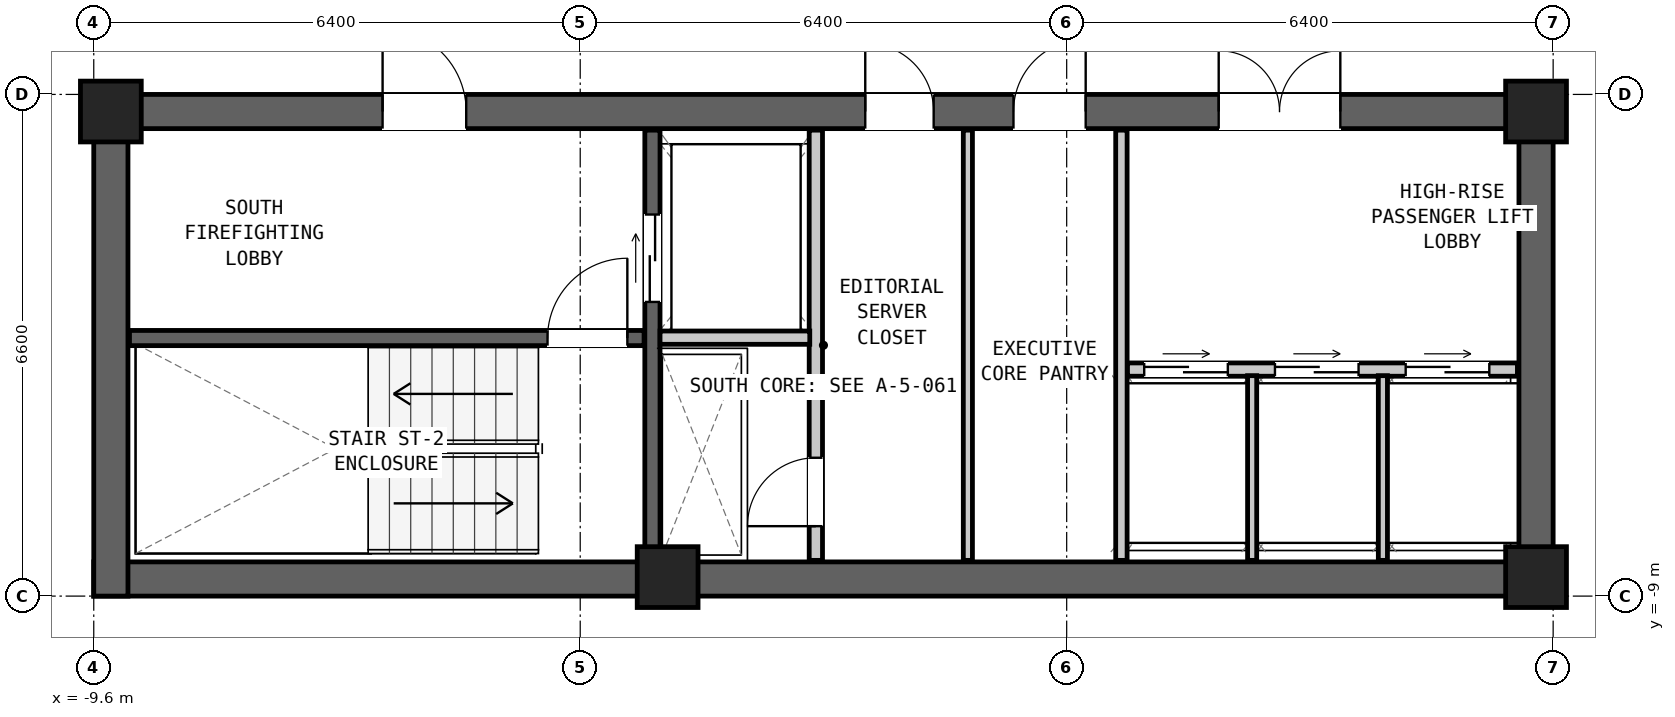
"""IFC4 building model, lengths in metres.
Left out: names, types, materials, properties, quantities, classifications, styles, units other than length and angle.
Written with IfcOpenShell. Run it as: python <this file> out.ifc"""

import sys

from ifc_helpers import new_model, si_unit, direction, frame, frame_2d, origin, origin_2d, place, context, subcontext, project, spatial, rectangle, extrude, element, fill, save


model = new_model("IFC4")
c1 = context("Model", 3, precision=1e-05, world=origin(), true_north=direction((0.0, 1.0)))
c2 = subcontext(c1, "Body", "Model", "MODEL_VIEW")
j1 = project(units=[si_unit("LENGTHUNIT", "METRE"), si_unit("PLANEANGLEUNIT", "RADIAN")], contexts=[c1])
p1 = place(None, origin())
s1 = spatial("IfcSite", under=j1, at=p1, CompositionType="ELEMENT")
p2 = place(p1, origin())
s2 = spatial("IfcBuilding", under=s1, at=p2, CompositionType="ELEMENT")
p3 = place(p2, frame((0.0, 0.0, 199.5)))
s3 = spatial("IfcBuildingStorey", under=s2, at=p3, CompositionType="ELEMENT", Elevation=199.5)
p4 = place(p3, frame((-9.6, -8.775, 0.0), z_axis=(0.0, 0.0, 1.0), x_axis=(1.0, 0.0, 0.0)))
e1 = element("IfcWall", 1, at=p4, inside=s3, PredefinedType="SHEAR", context=c2, shape_type="SweptSolid", body=[
    extrude(rectangle(XDim=19.2, YDim=0.45, at=frame_2d((9.6, 0.0))), origin(), (0.0, 0.0, 1.0), 3.05),
])
p5 = place(p3, frame((-9.6, -2.625, 0.0), z_axis=(0.0, 0.0, 1.0), x_axis=(1.0, 0.0, 0.0)))
e2 = element("IfcWall", 2, at=p5, inside=s3, PredefinedType="SHEAR", context=c2, shape_type="SweptSolid", body=[
    extrude(rectangle(XDim=19.2, YDim=0.45, at=frame_2d((9.6, 0.0))), origin(), (0.0, 0.0, 1.0), 3.05),
])
p6 = place(p5, frame((3.8, 0.0, 0.0)))
e3 = element("IfcOpeningElement", 3, at=p6, cuts=e2, PredefinedType="OPENING", context=c2, shape_type="SweptSolid", body=[
    extrude(rectangle(XDim=1.1, YDim=2.08, at=frame_2d((0.55, 1.04))), frame((0.0, 0.237, 0.0), z_axis=(0.0, -1.0, 0.0), x_axis=(1.0, 0.0, 0.0)), (0.0, 0.0, 1.0), 0.474),
])
p7 = place(p5, frame((10.15, 0.0, 0.0)))
e4 = element("IfcOpeningElement", 4, at=p7, cuts=e2, PredefinedType="OPENING", context=c2, shape_type="SweptSolid", body=[
    extrude(rectangle(XDim=0.9, YDim=2.05, at=frame_2d((0.45, 1.025))), frame((0.0, 0.237, 0.0), z_axis=(0.0, -1.0, 0.0), x_axis=(1.0, 0.0, 0.0)), (0.0, 0.0, 1.0), 0.474),
])
p8 = place(p5, frame((12.1, 0.0, 0.0)))
e5 = element("IfcOpeningElement", 5, at=p8, cuts=e2, PredefinedType="OPENING", context=c2, shape_type="SweptSolid", body=[
    extrude(rectangle(XDim=0.95, YDim=2.1, at=frame_2d((0.475, 1.05))), frame((0.0, 0.237, 0.0), z_axis=(0.0, -1.0, 0.0), x_axis=(1.0, 0.0, 0.0)), (0.0, 0.0, 1.0), 0.474),
])
p9 = place(p5, frame((14.8, 0.0, 0.0)))
e6 = element("IfcOpeningElement", 6, at=p9, cuts=e2, PredefinedType="OPENING", context=c2, shape_type="SweptSolid", body=[
    extrude(rectangle(XDim=1.6, YDim=2.12, at=frame_2d((0.8, 1.06))), frame((0.0, 0.237, 0.0), z_axis=(0.0, -1.0, 0.0), x_axis=(1.0, 0.0, 0.0)), (0.0, 0.0, 1.0), 0.474),
])
for number, where, z_axis, x_axis in (
    (7, (-9.375, -9.0, 0.0), (0.0, 0.0, 1.0), (0.0, 1.0, 0.0)),
    (8, (9.375, -9.0, 0.0), (0.0, 0.0, 1.0), (0.0, 1.0, 0.0)),
):
    element("IfcWall", number, at=place(p3, frame(where, z_axis=z_axis, x_axis=x_axis)), inside=s3, PredefinedType="SHEAR", context=c2, shape_type="SweptSolid", body=[
        extrude(rectangle(XDim=6.6, YDim=0.45, at=frame_2d((3.3, 0.0))), origin(), (0.0, 0.0, 1.0), 3.05),
    ])
for number, where, z_axis, x_axis in (
    (9, (-9.375, -2.625, 0.0), (0.0, 0.0, 1.0), (1.0, 0.0, 0.0)),
    (10, (9.375, -2.625, 0.0), (0.0, 0.0, 1.0), (1.0, 0.0, 0.0)),
    (11, (-2.05, -8.75, 0.0), (0.0, 0.0, 1.0), (1.0, 0.0, 0.0)),
    (12, (9.375, -8.75, 0.0), (0.0, 0.0, 1.0), (1.0, 0.0, 0.0)),
):
    element("IfcColumn", number, at=place(p3, frame(where, z_axis=z_axis, x_axis=x_axis)), inside=s3, PredefinedType="COLUMN", context=c2, shape_type="SweptSolid", body=[
        extrude(rectangle(XDim=0.8, YDim=0.8, at=origin_2d()), origin(), (0.0, 0.0, 1.0), 3.05),
    ])
p10 = place(p3, frame((-9.13, -5.605, 0.0), z_axis=(0.0, 0.0, 1.0), x_axis=(1.0, 0.0, 0.0)))
e13 = element("IfcWall", 13, at=p10, inside=s3, PredefinedType="SHEAR", context=c2, shape_type="SweptSolid", body=[
    extrude(rectangle(XDim=6.77, YDim=0.2, at=frame_2d((3.385, 0.0))), origin(), (0.0, 0.0, 1.0), 2.86),
])
p11 = place(p10, frame((5.5, 0.0, 0.0)))
e14 = element("IfcOpeningElement", 14, at=p11, cuts=e13, PredefinedType="OPENING", context=c2, shape_type="SweptSolid", body=[
    extrude(rectangle(XDim=1.05, YDim=2.08, at=frame_2d((0.525, 1.04))), frame((0.0, 0.112, 0.0), z_axis=(0.0, -1.0, 0.0), x_axis=(1.0, 0.0, 0.0)), (0.0, 0.0, 1.0), 0.224),
])
p12 = place(p3, frame((-2.25, -8.53, 0.0), z_axis=(0.0, 0.0, 1.0), x_axis=(0.0, 1.0, 0.0)))
e15 = element("IfcWall", 15, at=p12, inside=s3, PredefinedType="SHEAR", context=c2, shape_type="SweptSolid", body=[
    extrude(rectangle(XDim=5.66, YDim=0.2, at=frame_2d((2.83, 0.0))), origin(), (0.0, 0.0, 1.0), 2.86),
])
p13 = place(p12, frame((3.4, 0.0, 0.0)))
e16 = element("IfcOpeningElement", 16, at=p13, cuts=e15, PredefinedType="OPENING", context=c2, shape_type="SweptSolid", body=[
    extrude(rectangle(XDim=1.15, YDim=2.08, at=frame_2d((0.575, 1.04))), frame((0.0, 0.112, 0.0), z_axis=(0.0, -1.0, 0.0), x_axis=(1.0, 0.0, 0.0)), (0.0, 0.0, 1.0), 0.224),
])
p14 = place(p3, frame((-0.1, -8.53, 0.0), z_axis=(0.0, 0.0, 1.0), x_axis=(0.0, 1.0, 0.0)))
e17 = element("IfcWall", 17, at=p14, inside=s3, PredefinedType="PARTITIONING", context=c2, shape_type="SweptSolid", body=[
    extrude(rectangle(XDim=5.66, YDim=0.175, at=frame_2d((2.83, 0.0))), origin(), (0.0, 0.0, 1.0), 2.86),
])
p15 = place(p14, frame((0.45, 0.0, 0.0)))
e18 = element("IfcOpeningElement", 18, at=p15, cuts=e17, PredefinedType="OPENING", context=c2, shape_type="SweptSolid", body=[
    extrude(rectangle(XDim=0.9, YDim=2.05, at=frame_2d((0.45, 1.025))), frame((0.0, 0.1, 0.0), z_axis=(0.0, -1.0, 0.0), x_axis=(1.0, 0.0, 0.0)), (0.0, 0.0, 1.0), 0.199),
])
p16 = place(p3, frame((-2.15, -5.6, 0.0), z_axis=(0.0, 0.0, 1.0), x_axis=(1.0, 0.0, 0.0)))
e19 = element("IfcWall", 19, at=p16, inside=s3, PredefinedType="PARTITIONING", context=c2, shape_type="SweptSolid", body=[
    extrude(rectangle(XDim=1.97, YDim=0.175, at=frame_2d((0.985, 0.0))), origin(), (0.0, 0.0, 1.0), 2.86),
])
p17 = place(p3, frame((3.92, -8.53, 0.0), z_axis=(0.0, 0.0, 1.0), x_axis=(0.0, 1.0, 0.0)))
e20 = element("IfcWall", 20, at=p17, inside=s3, PredefinedType="PARTITIONING", context=c2, shape_type="SweptSolid", body=[
    extrude(rectangle(XDim=5.66, YDim=0.15, at=frame_2d((2.83, 0.0))), origin(), (0.0, 0.0, 1.0), 2.86),
])
p18 = place(p3, frame((1.9, -8.53, 0.0), z_axis=(0.0, 0.0, 1.0), x_axis=(0.0, 1.0, 0.0)))
e21 = element("IfcWall", 21, at=p18, inside=s3, PredefinedType="PARTITIONING", context=c2, shape_type="SweptSolid", body=[
    extrude(rectangle(XDim=5.66, YDim=0.12, at=frame_2d((2.83, 0.0))), origin(), (0.0, 0.0, 1.0), 2.86),
])
p19 = place(p3, frame((4.0, -6.02, 0.0), z_axis=(0.0, 0.0, 1.0), x_axis=(1.0, 0.0, 0.0)))
e22 = element("IfcWall", 22, at=p19, inside=s3, PredefinedType="PARTITIONING", context=c2, shape_type="SweptSolid", body=[
    extrude(rectangle(XDim=5.13, YDim=0.175, at=frame_2d((2.565, 0.0))), origin(), (0.0, 0.0, 1.0), 2.86),
])
p20 = place(p19, frame((0.22, 0.0, 0.0)))
e23 = element("IfcOpeningElement", 23, at=p20, cuts=e22, PredefinedType="OPENING", context=c2, shape_type="SweptSolid", body=[
    extrude(rectangle(XDim=1.1, YDim=2.06, at=frame_2d((0.55, 1.03))), frame((0.0, 0.1, 0.0), z_axis=(0.0, -1.0, 0.0), x_axis=(1.0, 0.0, 0.0)), (0.0, 0.0, 1.0), 0.199),
])
p21 = place(p19, frame((1.94, 0.0, 0.0)))
e24 = element("IfcOpeningElement", 24, at=p21, cuts=e22, PredefinedType="OPENING", context=c2, shape_type="SweptSolid", body=[
    extrude(rectangle(XDim=1.1, YDim=2.06, at=frame_2d((0.55, 1.03))), frame((0.0, 0.1, 0.0), z_axis=(0.0, -1.0, 0.0), x_axis=(1.0, 0.0, 0.0)), (0.0, 0.0, 1.0), 0.199),
])
p22 = place(p19, frame((3.66, 0.0, 0.0)))
e25 = element("IfcOpeningElement", 25, at=p22, cuts=e22, PredefinedType="OPENING", context=c2, shape_type="SweptSolid", body=[
    extrude(rectangle(XDim=1.1, YDim=2.06, at=frame_2d((0.55, 1.03))), frame((0.0, 0.1, 0.0), z_axis=(0.0, -1.0, 0.0), x_axis=(1.0, 0.0, 0.0)), (0.0, 0.0, 1.0), 0.199),
])
for number, where, z_axis, x_axis in (
    (26, (5.64, -8.53, 0.0), (0.0, 0.0, 1.0), (0.0, 1.0, 0.0)),
    (27, (7.36, -8.53, 0.0), (0.0, 0.0, 1.0), (0.0, 1.0, 0.0)),
):
    element("IfcWall", number, at=place(p3, frame(where, z_axis=z_axis, x_axis=x_axis)), inside=s3, PredefinedType="PARTITIONING", context=c2, shape_type="SweptSolid", body=[
        extrude(rectangle(XDim=2.43, YDim=0.12, at=frame_2d((1.215, 0.0))), origin(), (0.0, 0.0, 1.0), 2.86),
    ])
p23 = place(p11, origin())
e28 = element("IfcDoor", 28, at=p23, inside=s3, OperationType="SINGLE_SWING_RIGHT", PredefinedType="DOOR", context=c2, shape_type="SweptSolid", body=[
    extrude(rectangle(XDim=1.05, YDim=2.08, at=frame_2d((0.525, 1.04))), frame((0.0, 0.025, 0.0), z_axis=(0.0, -1.0, 0.0), x_axis=(1.0, 0.0, 0.0)), (0.0, 0.0, 1.0), 0.05),
])
fill(e14, e28)
p24 = place(p6, origin())
e29 = element("IfcDoor", 29, at=p24, inside=s3, OperationType="SINGLE_SWING_LEFT", PredefinedType="DOOR", context=c2, shape_type="SweptSolid", body=[
    extrude(rectangle(XDim=1.1, YDim=2.08, at=frame_2d((0.55, 1.04))), frame((0.0, 0.025, 0.0), z_axis=(0.0, -1.0, 0.0), x_axis=(1.0, 0.0, 0.0)), (0.0, 0.0, 1.0), 0.05),
])
fill(e3, e29)
p25 = place(p13, origin())
e30 = element("IfcDoor", 30, at=p25, inside=s3, OperationType="DOUBLE_DOOR_SLIDING", PredefinedType="DOOR", context=c2, shape_type="SweptSolid", body=[
    extrude(rectangle(XDim=1.15, YDim=2.08, at=frame_2d((0.575, 1.04))), frame((0.0, 0.025, 0.0), z_axis=(0.0, -1.0, 0.0), x_axis=(1.0, 0.0, 0.0)), (0.0, 0.0, 1.0), 0.05),
])
fill(e16, e30)
p26 = place(p15, origin())
e31 = element("IfcDoor", 31, at=p26, inside=s3, OperationType="SINGLE_SWING_LEFT", PredefinedType="DOOR", context=c2, shape_type="SweptSolid", body=[
    extrude(rectangle(XDim=0.9, YDim=2.05, at=frame_2d((0.45, 1.025))), frame((0.0, 0.025, 0.0), z_axis=(0.0, -1.0, 0.0), x_axis=(1.0, 0.0, 0.0)), (0.0, 0.0, 1.0), 0.05),
])
fill(e18, e31)
p27 = place(p7, origin())
e32 = element("IfcDoor", 32, at=p27, inside=s3, OperationType="SINGLE_SWING_LEFT", PredefinedType="DOOR", context=c2, shape_type="SweptSolid", body=[
    extrude(rectangle(XDim=0.9, YDim=2.05, at=frame_2d((0.45, 1.025))), frame((0.0, 0.025, 0.0), z_axis=(0.0, -1.0, 0.0), x_axis=(1.0, 0.0, 0.0)), (0.0, 0.0, 1.0), 0.05),
])
fill(e4, e32)
p28 = place(p8, origin())
e33 = element("IfcDoor", 33, at=p28, inside=s3, OperationType="SINGLE_SWING_RIGHT", PredefinedType="DOOR", context=c2, shape_type="SweptSolid", body=[
    extrude(rectangle(XDim=0.95, YDim=2.1, at=frame_2d((0.475, 1.05))), frame((0.0, 0.025, 0.0), z_axis=(0.0, -1.0, 0.0), x_axis=(1.0, 0.0, 0.0)), (0.0, 0.0, 1.0), 0.05),
])
fill(e5, e33)
p29 = place(p20, origin())
e34 = element("IfcDoor", 34, at=p29, inside=s3, OperationType="DOUBLE_DOOR_SLIDING", PredefinedType="DOOR", context=c2, shape_type="SweptSolid", body=[
    extrude(rectangle(XDim=1.1, YDim=2.06, at=frame_2d((0.55, 1.03))), frame((0.0, 0.025, 0.0), z_axis=(0.0, -1.0, 0.0), x_axis=(1.0, 0.0, 0.0)), (0.0, 0.0, 1.0), 0.05),
])
fill(e23, e34)
p30 = place(p21, origin())
e35 = element("IfcDoor", 35, at=p30, inside=s3, OperationType="DOUBLE_DOOR_SLIDING", PredefinedType="DOOR", context=c2, shape_type="SweptSolid", body=[
    extrude(rectangle(XDim=1.1, YDim=2.06, at=frame_2d((0.55, 1.03))), frame((0.0, 0.025, 0.0), z_axis=(0.0, -1.0, 0.0), x_axis=(1.0, 0.0, 0.0)), (0.0, 0.0, 1.0), 0.05),
])
fill(e24, e35)
p31 = place(p22, origin())
e36 = element("IfcDoor", 36, at=p31, inside=s3, OperationType="DOUBLE_DOOR_SLIDING", PredefinedType="DOOR", context=c2, shape_type="SweptSolid", body=[
    extrude(rectangle(XDim=1.1, YDim=2.06, at=frame_2d((0.55, 1.03))), frame((0.0, 0.025, 0.0), z_axis=(0.0, -1.0, 0.0), x_axis=(1.0, 0.0, 0.0)), (0.0, 0.0, 1.0), 0.05),
])
fill(e25, e36)
p32 = place(p9, origin())
e37 = element("IfcDoor", 37, at=p32, inside=s3, OperationType="DOUBLE_DOOR_SINGLE_SWING", PredefinedType="DOOR", context=c2, shape_type="SweptSolid", body=[
    extrude(rectangle(XDim=1.6, YDim=2.12, at=frame_2d((0.8, 1.06))), frame((0.0, 0.025, 0.0), z_axis=(0.0, -1.0, 0.0), x_axis=(1.0, 0.0, 0.0)), (0.0, 0.0, 1.0), 0.05),
])
fill(e6, e37)
save(model, sys.argv[1])
